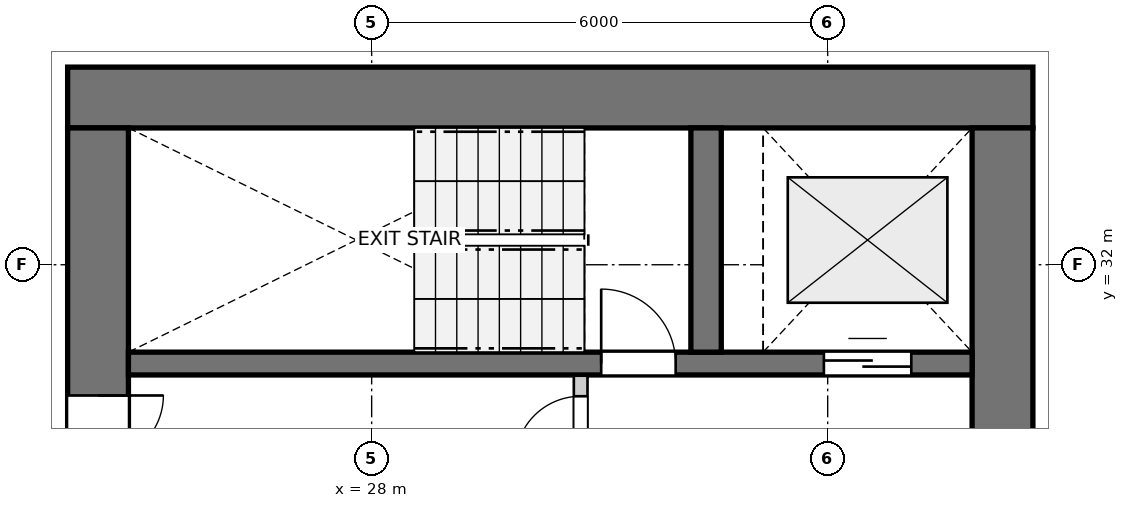
"""IFC4 building model, lengths in metres.
Left out: names, types, materials, properties, quantities, classifications, styles, units other than length and angle.
Written with IfcOpenShell. Run it as: python <this file> out.ifc"""

import sys

from ifc_helpers import new_model, si_unit, direction, frame, frame_2d, origin, place, context, subcontext, project, spatial, rectangle, extrude, source, transform, mapped, element, fill, save


model = new_model("IFC4")
c1 = context("Model", 3, precision=1e-05, world=origin(), true_north=direction((0.0, 1.0)))
c2 = subcontext(c1, "Body", "Model", "MODEL_VIEW")
j1 = project(units=[si_unit("LENGTHUNIT", "METRE"), si_unit("PLANEANGLEUNIT", "RADIAN")], contexts=[c1])
p1 = place(None, origin())
s1 = spatial("IfcSite", under=j1, at=p1, CompositionType="ELEMENT")
p2 = place(p1, origin())
s2 = spatial("IfcBuilding", under=s1, at=p2, CompositionType="ELEMENT")
p3 = place(p2, frame((0.0, 0.0, 39.8)))
s3 = spatial("IfcBuildingStorey", under=s2, at=p3, CompositionType="ELEMENT", Elevation=39.8)
p4 = place(p3, frame((36.7, 34.2, 0.0), z_axis=(0.0, 0.0, 1.0), x_axis=(-1.0, 0.0, 0.0)))
e1 = element("IfcWall", 1, at=p4, inside=s3, PredefinedType="SHEAR", context=c2, shape_type="SweptSolid", body=[
    extrude(rectangle(XDim=12.7, YDim=0.8, at=frame_2d((6.35, 0.0))), origin(), (0.0, 0.0, 1.0), 2.94),
])
p5 = place(p3, frame((24.4, 33.8, 0.0), z_axis=(0.0, 0.0, 1.0), x_axis=(0.0, -1.0, 0.0)))
e2 = element("IfcWall", 2, at=p5, inside=s3, PredefinedType="SHEAR", context=c2, shape_type="SweptSolid", body=[
    extrude(rectangle(XDim=15.6, YDim=0.8, at=frame_2d((7.8, 0.0))), origin(), (0.0, 0.0, 1.0), 2.94),
])
p6 = place(p5, frame((7.05, 0.0, 0.0)))
e3 = element("IfcOpeningElement", 3, at=p6, cuts=e2, PredefinedType="OPENING", context=c2, shape_type="SweptSolid", body=[
    extrude(rectangle(XDim=1.5, YDim=2.15, at=frame_2d((0.75, 1.075))), frame((0.0, 0.41, 0.0), z_axis=(0.0, -1.0, 0.0), x_axis=(1.0, 0.0, 0.0)), (0.0, 0.0, 1.0), 0.82),
])
p7 = place(p5, frame((3.52, 0.0, 0.0)))
e4 = element("IfcOpeningElement", 4, at=p7, cuts=e2, PredefinedType="OPENING", context=c2, shape_type="SweptSolid", body=[
    extrude(rectangle(XDim=0.86, YDim=2.05, at=frame_2d((0.43, 1.025))), frame((0.0, 0.41, 0.0), z_axis=(0.0, -1.0, 0.0), x_axis=(1.0, 0.0, 0.0)), (0.0, 0.0, 1.0), 0.82),
])
p8 = place(p5, frame((11.22, 0.0, 0.0)))
e5 = element("IfcOpeningElement", 5, at=p8, cuts=e2, PredefinedType="OPENING", context=c2, shape_type="SweptSolid", body=[
    extrude(rectangle(XDim=0.86, YDim=2.05, at=frame_2d((0.43, 1.025))), frame((0.0, 0.41, 0.0), z_axis=(0.0, -1.0, 0.0), x_axis=(1.0, 0.0, 0.0)), (0.0, 0.0, 1.0), 0.82),
])
p9 = place(p3, frame((36.3, 18.2, 0.0), z_axis=(0.0, 0.0, 1.0), x_axis=(0.0, 1.0, 0.0)))
e6 = element("IfcWall", 6, at=p9, inside=s3, PredefinedType="SHEAR", context=c2, shape_type="SweptSolid", body=[
    extrude(rectangle(XDim=15.6, YDim=0.8, at=frame_2d((7.8, 0.0))), origin(), (0.0, 0.0, 1.0), 2.94),
])
p10 = place(p9, frame((4.25, 0.0, 0.0)))
e7 = element("IfcOpeningElement", 7, at=p10, cuts=e6, PredefinedType="OPENING", context=c2, shape_type="SweptSolid", body=[
    extrude(rectangle(XDim=1.1, YDim=2.15, at=frame_2d((0.55, 1.075))), frame((0.0, 0.41, 0.0), z_axis=(0.0, -1.0, 0.0), x_axis=(1.0, 0.0, 0.0)), (0.0, 0.0, 1.0), 0.82),
])
p11 = place(p9, frame((10.25, 0.0, 0.0)))
e8 = element("IfcOpeningElement", 8, at=p11, cuts=e6, PredefinedType="OPENING", context=c2, shape_type="SweptSolid", body=[
    extrude(rectangle(XDim=1.1, YDim=2.15, at=frame_2d((0.55, 1.075))), frame((0.0, 0.41, 0.0), z_axis=(0.0, -1.0, 0.0), x_axis=(1.0, 0.0, 0.0)), (0.0, 0.0, 1.0), 0.82),
])
p12 = place(p3, frame((24.8, 30.7, 0.0), z_axis=(0.0, 0.0, 1.0), x_axis=(1.0, 0.0, 0.0)))
e9 = element("IfcWall", 9, at=p12, inside=s3, PredefinedType="SHEAR", context=c2, shape_type="SweptSolid", body=[
    extrude(rectangle(XDim=11.1, YDim=0.3, at=frame_2d((5.55, 0.0))), origin(), (0.0, 0.0, 1.0), 2.94),
])
p13 = place(p12, frame((6.22, 0.0, 0.0)))
e10 = element("IfcOpeningElement", 10, at=p13, cuts=e9, PredefinedType="OPENING", context=c2, shape_type="SweptSolid", body=[
    extrude(rectangle(XDim=0.98, YDim=2.15, at=frame_2d((0.49, 1.075))), frame((0.0, 0.16, 0.0), z_axis=(0.0, -1.0, 0.0), x_axis=(1.0, 0.0, 0.0)), (0.0, 0.0, 1.0), 0.32),
])
p14 = place(p12, frame((9.15, 0.0, 0.0)))
e11 = element("IfcOpeningElement", 11, at=p14, cuts=e9, PredefinedType="OPENING", context=c2, shape_type="SweptSolid", body=[
    extrude(rectangle(XDim=1.15, YDim=2.15, at=frame_2d((0.575, 1.075))), frame((0.0, 0.16, 0.0), z_axis=(0.0, -1.0, 0.0), x_axis=(1.0, 0.0, 0.0)), (0.0, 0.0, 1.0), 0.32),
])
p15 = place(p3, frame((32.4, 30.85, 0.0), z_axis=(0.0, 0.0, 1.0), x_axis=(0.0, 1.0, 0.0)))
e12 = element("IfcWall", 12, at=p15, inside=s3, PredefinedType="SHEAR", context=c2, shape_type="SweptSolid", body=[
    extrude(rectangle(XDim=2.95, YDim=0.4, at=frame_2d((1.475, 0.0))), origin(), (0.0, 0.0, 1.0), 2.94),
])
p16 = place(p3, frame((30.75, 27.43, 0.0), z_axis=(0.0, 0.0, 1.0), x_axis=(0.0, 1.0, 0.0)))
e13 = element("IfcWall", 13, at=p16, inside=s3, PredefinedType="PARTITIONING", context=c2, shape_type="SweptSolid", body=[
    extrude(rectangle(XDim=3.11, YDim=0.18, at=frame_2d((1.555, 0.0))), origin(), (0.0, 0.0, 1.0), 2.94),
])
p17 = place(p16, frame((1.98, 0.0, 0.0)))
e14 = element("IfcOpeningElement", 14, at=p17, cuts=e13, PredefinedType="OPENING", context=c2, shape_type="SweptSolid", body=[
    extrude(rectangle(XDim=0.86, YDim=2.05, at=frame_2d((0.43, 1.025))), frame((0.0, 0.1, 0.0), z_axis=(0.0, -1.0, 0.0), x_axis=(1.0, 0.0, 0.0)), (0.0, 0.0, 1.0), 0.2),
])
m1 = source(origin(), c2, "Body", "SweptSolid", [
    extrude(rectangle(XDim=0.98, YDim=2.15, at=frame_2d((0.49, 1.075))), frame((0.0, 0.025, 0.0), z_axis=(0.0, -1.0, 0.0), x_axis=(1.0, 0.0, 0.0)), (0.0, 0.0, 1.0), 0.05),
])
p18 = place(p13, origin())
e15 = element("IfcDoor", 15, at=p18, inside=s3, OperationType="SINGLE_SWING_LEFT", PredefinedType="DOOR", context=c2, shape_type="MappedRepresentation", body=[
    mapped(m1, transform((0.0, 0.0, 0.0), x_axis=(1.0, 0.0, 0.0), y_axis=(0.0, 1.0, 0.0), z_axis=(0.0, 0.0, 1.0), scale=1.0)),
])
fill(e10, e15)
m2 = source(origin(), c2, "Body", "SweptSolid", [
    extrude(rectangle(XDim=1.15, YDim=2.15, at=frame_2d((0.575, 1.075))), frame((0.0, 0.025, 0.0), z_axis=(0.0, -1.0, 0.0), x_axis=(1.0, 0.0, 0.0)), (0.0, 0.0, 1.0), 0.05),
])
p19 = place(p14, origin())
e16 = element("IfcDoor", 16, at=p19, inside=s3, OperationType="DOUBLE_DOOR_SLIDING", PredefinedType="DOOR", context=c2, shape_type="MappedRepresentation", body=[
    mapped(m2, transform((0.0, 0.0, 0.0), x_axis=(1.0, 0.0, 0.0), y_axis=(0.0, 1.0, 0.0), z_axis=(0.0, 0.0, 1.0), scale=1.0)),
])
fill(e11, e16)
m3 = source(origin(), c2, "Body", "SweptSolid", [
    extrude(rectangle(XDim=0.86, YDim=2.05, at=frame_2d((0.43, 1.025))), frame((0.0, 0.025, 0.0), z_axis=(0.0, -1.0, 0.0), x_axis=(1.0, 0.0, 0.0)), (0.0, 0.0, 1.0), 0.05),
])
p20 = place(p7, origin())
e17 = element("IfcDoor", 17, at=p20, inside=s3, OperationType="SINGLE_SWING_LEFT", PredefinedType="DOOR", context=c2, shape_type="MappedRepresentation", body=[
    mapped(m3, transform((0.0, 0.0, 0.0), x_axis=(1.0, 0.0, 0.0), y_axis=(0.0, 1.0, 0.0), z_axis=(0.0, 0.0, 1.0), scale=1.0)),
])
fill(e4, e17)
p21 = place(p17, origin())
e18 = element("IfcDoor", 18, at=p21, inside=s3, OperationType="SINGLE_SWING_LEFT", PredefinedType="DOOR", context=c2, shape_type="MappedRepresentation", body=[
    mapped(m3, transform((0.0, 0.0, 0.0), x_axis=(1.0, 0.0, 0.0), y_axis=(0.0, 1.0, 0.0), z_axis=(0.0, 0.0, 1.0), scale=1.0)),
])
fill(e14, e18)
save(model, sys.argv[1])
